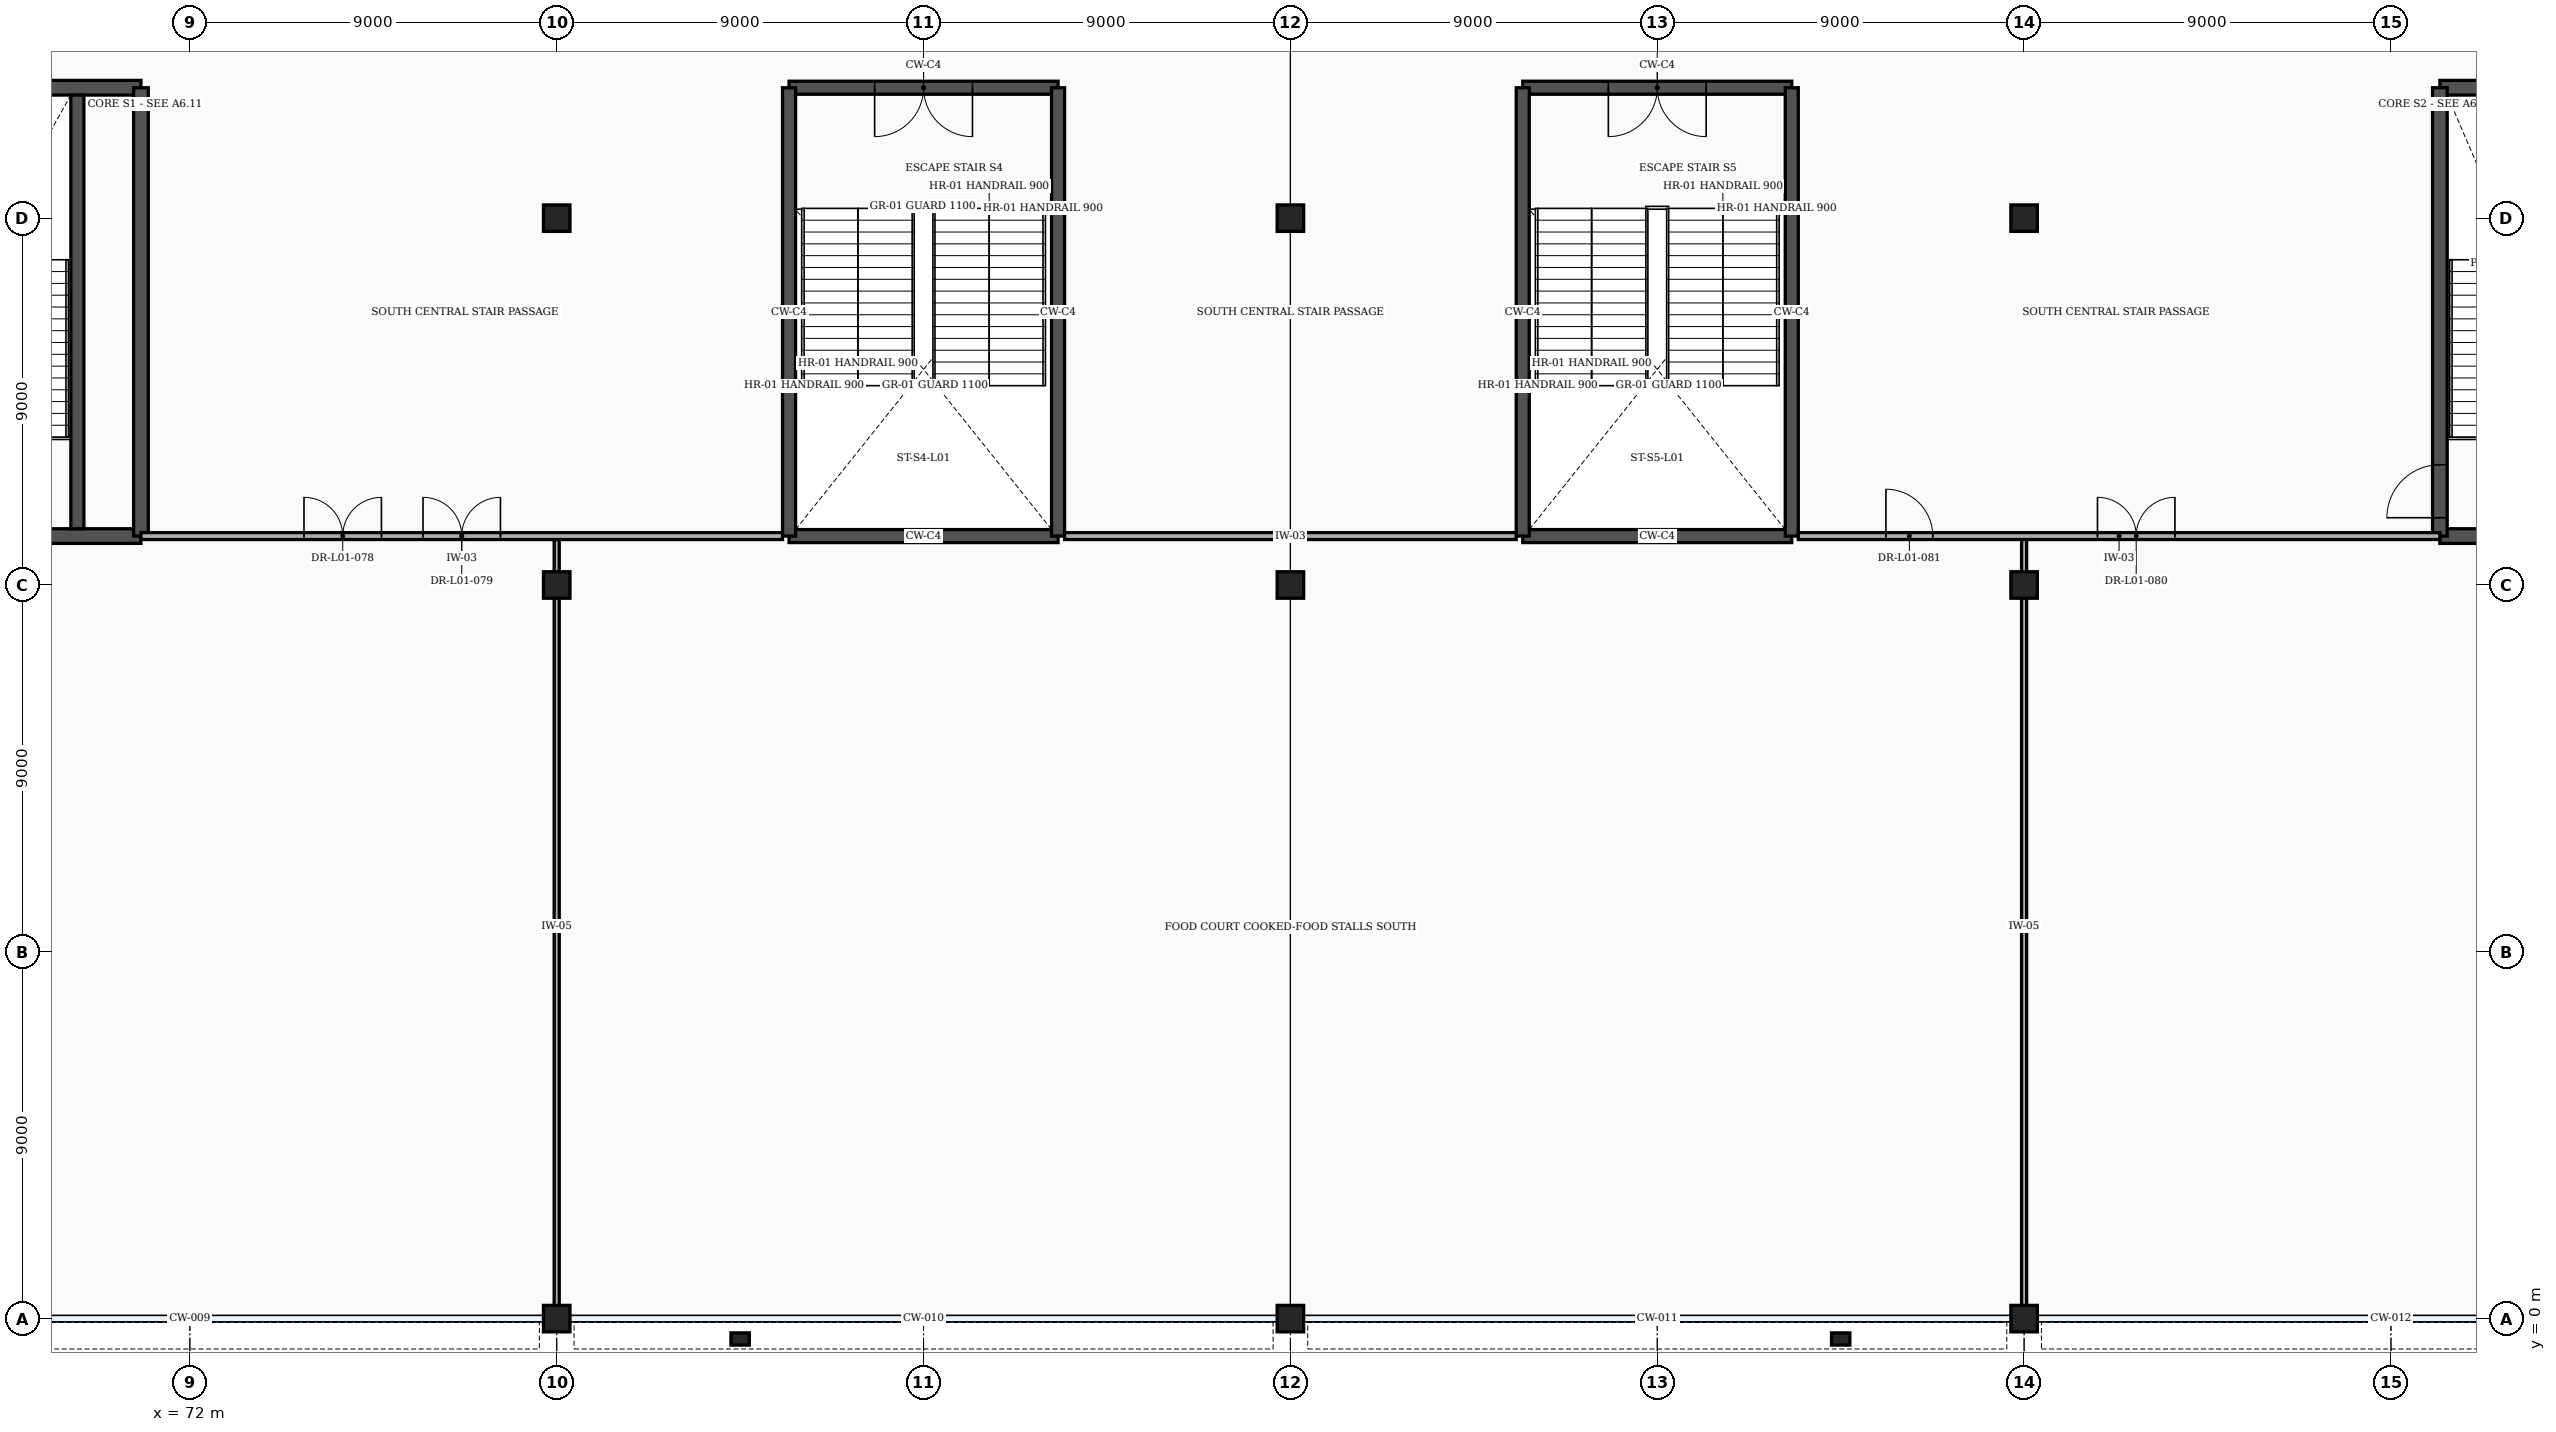
"""IFC4 building model, lengths in metres.
Left out: names, types, materials, properties, quantities, classifications, styles, units other than length and angle.
Written with IfcOpenShell. Run it as: python <this file> out.ifc"""

import sys

from ifc_helpers import new_model, si_unit, direction, frame, frame_2d, origin, origin_2d, place, context, subcontext, project, spatial, rectangle, extrude, element, fill, save


model = new_model("IFC4")
c1 = context("Model", 3, precision=1e-05, world=origin(), true_north=direction((0.0, 1.0)))
c2 = subcontext(c1, "Body", "Model", "MODEL_VIEW")
j1 = project(units=[si_unit("LENGTHUNIT", "METRE"), si_unit("PLANEANGLEUNIT", "RADIAN")], contexts=[c1])
p1 = place(None, origin())
s1 = spatial("IfcSite", under=j1, at=p1, CompositionType="ELEMENT")
p2 = place(p1, origin())
s2 = spatial("IfcBuilding", under=s1, at=p2, CompositionType="ELEMENT")
p3 = place(p2, frame((0.0, 0.0, 6.0)))
s3 = spatial("IfcBuildingStorey", under=s2, at=p3, CompositionType="ELEMENT", Elevation=6.0)
for number, where, z_axis, x_axis in (
    (1, (81.0, 0.0, 0.0), (0.0, 0.0, 1.0), (1.0, 0.0, 0.0)),
    (2, (81.0, 18.0, 0.0), (0.0, 0.0, 1.0), (1.0, 0.0, 0.0)),
    (3, (81.0, 27.0, 0.0), (0.0, 0.0, 1.0), (1.0, 0.0, 0.0)),
    (4, (99.0, 0.0, 0.0), (0.0, 0.0, 1.0), (1.0, 0.0, 0.0)),
    (5, (99.0, 18.0, 0.0), (0.0, 0.0, 1.0), (1.0, 0.0, 0.0)),
    (6, (99.0, 27.0, 0.0), (0.0, 0.0, 1.0), (1.0, 0.0, 0.0)),
    (7, (117.0, 0.0, 0.0), (0.0, 0.0, 1.0), (1.0, 0.0, 0.0)),
    (8, (117.0, 18.0, 0.0), (0.0, 0.0, 1.0), (1.0, 0.0, 0.0)),
    (9, (117.0, 27.0, 0.0), (0.0, 0.0, 1.0), (1.0, 0.0, 0.0)),
):
    element("IfcColumn", number, at=place(p3, frame(where, z_axis=z_axis, x_axis=x_axis)), inside=s3, PredefinedType="COLUMN", context=c2, shape_type="SweptSolid", body=[
        extrude(rectangle(XDim=0.65, YDim=0.65, at=origin_2d()), origin(), (0.0, 0.0, 1.0), 5.4),
    ])
for number, where, z_axis, x_axis in (
    (10, (85.5, -0.5, 0.0), (0.0, 0.0, 1.0), (1.0, 0.0, 0.0)),
    (11, (112.5, -0.5, 0.0), (0.0, 0.0, 1.0), (1.0, 0.0, 0.0)),
):
    element("IfcColumn", number, at=place(p3, frame(where, z_axis=z_axis, x_axis=x_axis)), inside=s3, PredefinedType="PILASTER", context=c2, shape_type="SweptSolid", body=[
        extrude(rectangle(XDim=0.45, YDim=0.3, at=origin_2d()), origin(), (0.0, 0.0, 1.0), 5.4),
    ])
for number, where, z_axis, x_axis in (
    (12, (64.2, 19.2, 0.0), (0.0, 0.0, 1.0), (1.0, 0.0, 0.0)),
    (13, (64.2, 30.2, 0.0), (0.0, 0.0, 1.0), (1.0, 0.0, 0.0)),
):
    element("IfcWall", number, at=place(p3, frame(where, z_axis=z_axis, x_axis=x_axis)), inside=s3, PredefinedType="SHEAR", context=c2, shape_type="SweptSolid", body=[
        extrude(rectangle(XDim=6.6, YDim=0.36, at=frame_2d((3.3, 0.0))), origin(), (0.0, 0.0, 1.0), 5.15),
    ])
p4 = place(p3, frame((70.8, 19.2, 0.0), z_axis=(0.0, 0.0, 1.0), x_axis=(0.0, 1.0, 0.0)))
e14 = element("IfcWall", 14, at=p4, inside=s3, PredefinedType="SHEAR", context=c2, shape_type="SweptSolid", body=[
    extrude(rectangle(XDim=11.0, YDim=0.36, at=frame_2d((5.5, 0.0))), origin(), (0.0, 0.0, 1.0), 5.15),
])
p5 = place(p3, frame((69.24, 19.38, 0.0), z_axis=(0.0, 0.0, 1.0), x_axis=(0.0, 1.0, 0.0)))
e15 = element("IfcWall", 15, at=p5, inside=s3, PredefinedType="SHEAR", context=c2, shape_type="SweptSolid", body=[
    extrude(rectangle(XDim=10.64, YDim=0.32, at=frame_2d((5.32, 0.0))), origin(), (0.0, 0.0, 1.0), 5.15),
])
p6 = place(p3, frame((127.2, 19.2, 0.0), z_axis=(0.0, 0.0, 1.0), x_axis=(1.0, 0.0, 0.0)))
e16 = element("IfcWall", 16, at=p6, inside=s3, PredefinedType="SHEAR", context=c2, shape_type="SweptSolid", body=[
    extrude(rectangle(XDim=6.6, YDim=0.36, at=frame_2d((3.3, 0.0))), origin(), (0.0, 0.0, 1.0), 5.15),
])
p7 = place(p3, frame((127.2, 30.2, 0.0), z_axis=(0.0, 0.0, 1.0), x_axis=(1.0, 0.0, 0.0)))
e17 = element("IfcWall", 17, at=p7, inside=s3, PredefinedType="SHEAR", context=c2, shape_type="SweptSolid", body=[
    extrude(rectangle(XDim=6.6, YDim=0.36, at=frame_2d((3.3, 0.0))), origin(), (0.0, 0.0, 1.0), 5.15),
])
p8 = place(p7, frame((4.45, 0.0, 0.0)))
e18 = element("IfcOpeningElement", 18, at=p8, cuts=e17, PredefinedType="OPENING", context=c2, shape_type="SweptSolid", body=[
    extrude(rectangle(XDim=1.6, YDim=2.3, at=frame_2d((0.8, 1.15))), frame((0.0, 0.192, 0.0), z_axis=(0.0, -1.0, 0.0), x_axis=(1.0, 0.0, 0.0)), (0.0, 0.0, 1.0), 0.384),
])
p9 = place(p3, frame((127.2, 19.2, 0.0), z_axis=(0.0, 0.0, 1.0), x_axis=(0.0, 1.0, 0.0)))
e19 = element("IfcWall", 19, at=p9, inside=s3, PredefinedType="SHEAR", context=c2, shape_type="SweptSolid", body=[
    extrude(rectangle(XDim=11.0, YDim=0.36, at=frame_2d((5.5, 0.0))), origin(), (0.0, 0.0, 1.0), 5.15),
])
p10 = place(p9, frame((0.45, 0.0, 0.0)))
e20 = element("IfcOpeningElement", 20, at=p10, cuts=e19, PredefinedType="OPENING", context=c2, shape_type="SweptSolid", body=[
    extrude(rectangle(XDim=1.3, YDim=2.2, at=frame_2d((0.65, 1.1))), frame((0.0, 0.192, 0.0), z_axis=(0.0, -1.0, 0.0), x_axis=(1.0, 0.0, 0.0)), (0.0, 0.0, 1.0), 0.384),
])
p11 = place(p3, frame((86.7, 19.2, 0.0), z_axis=(0.0, 0.0, 1.0), x_axis=(1.0, 0.0, 0.0)))
e21 = element("IfcWall", 21, at=p11, inside=s3, PredefinedType="SHEAR", context=c2, shape_type="SweptSolid", body=[
    extrude(rectangle(XDim=6.6, YDim=0.32, at=frame_2d((3.3, 0.0))), origin(), (0.0, 0.0, 1.0), 5.15),
])
p12 = place(p3, frame((86.7, 30.2, 0.0), z_axis=(0.0, 0.0, 1.0), x_axis=(1.0, 0.0, 0.0)))
e22 = element("IfcWall", 22, at=p12, inside=s3, PredefinedType="SHEAR", context=c2, shape_type="SweptSolid", body=[
    extrude(rectangle(XDim=6.6, YDim=0.32, at=frame_2d((3.3, 0.0))), origin(), (0.0, 0.0, 1.0), 5.15),
])
p13 = place(p12, frame((2.1, 0.0, 0.0)))
e23 = element("IfcOpeningElement", 23, at=p13, cuts=e22, PredefinedType="OPENING", context=c2, shape_type="SweptSolid", body=[
    extrude(rectangle(XDim=2.4, YDim=2.25, at=frame_2d((1.2, 1.125))), frame((0.0, 0.172, 0.0), z_axis=(0.0, -1.0, 0.0), x_axis=(1.0, 0.0, 0.0)), (0.0, 0.0, 1.0), 0.344),
])
for number, where, z_axis, x_axis in (
    (24, (86.7, 19.2, 0.0), (0.0, 0.0, 1.0), (0.0, 1.0, 0.0)),
    (25, (93.3, 19.2, 0.0), (0.0, 0.0, 1.0), (0.0, 1.0, 0.0)),
):
    element("IfcWall", number, at=place(p3, frame(where, z_axis=z_axis, x_axis=x_axis)), inside=s3, PredefinedType="SHEAR", context=c2, shape_type="SweptSolid", body=[
        extrude(rectangle(XDim=11.0, YDim=0.32, at=frame_2d((5.5, 0.0))), origin(), (0.0, 0.0, 1.0), 5.15),
    ])
p14 = place(p3, frame((104.7, 19.2, 0.0), z_axis=(0.0, 0.0, 1.0), x_axis=(1.0, 0.0, 0.0)))
e26 = element("IfcWall", 26, at=p14, inside=s3, PredefinedType="SHEAR", context=c2, shape_type="SweptSolid", body=[
    extrude(rectangle(XDim=6.6, YDim=0.32, at=frame_2d((3.3, 0.0))), origin(), (0.0, 0.0, 1.0), 5.15),
])
p15 = place(p3, frame((104.7, 30.2, 0.0), z_axis=(0.0, 0.0, 1.0), x_axis=(1.0, 0.0, 0.0)))
e27 = element("IfcWall", 27, at=p15, inside=s3, PredefinedType="SHEAR", context=c2, shape_type="SweptSolid", body=[
    extrude(rectangle(XDim=6.6, YDim=0.32, at=frame_2d((3.3, 0.0))), origin(), (0.0, 0.0, 1.0), 5.15),
])
p16 = place(p15, frame((2.1, 0.0, 0.0)))
e28 = element("IfcOpeningElement", 28, at=p16, cuts=e27, PredefinedType="OPENING", context=c2, shape_type="SweptSolid", body=[
    extrude(rectangle(XDim=2.4, YDim=2.25, at=frame_2d((1.2, 1.125))), frame((0.0, 0.172, 0.0), z_axis=(0.0, -1.0, 0.0), x_axis=(1.0, 0.0, 0.0)), (0.0, 0.0, 1.0), 0.344),
])
for number, where, z_axis, x_axis in (
    (29, (104.7, 19.2, 0.0), (0.0, 0.0, 1.0), (0.0, 1.0, 0.0)),
    (30, (111.3, 19.2, 0.0), (0.0, 0.0, 1.0), (0.0, 1.0, 0.0)),
):
    element("IfcWall", number, at=place(p3, frame(where, z_axis=z_axis, x_axis=x_axis)), inside=s3, PredefinedType="SHEAR", context=c2, shape_type="SweptSolid", body=[
        extrude(rectangle(XDim=11.0, YDim=0.32, at=frame_2d((5.5, 0.0))), origin(), (0.0, 0.0, 1.0), 5.15),
    ])
for number, where, z_axis, x_axis in (
    (31, (81.0, 0.157, 0.0), (0.0, 0.0, 1.0), (0.0, 1.0, 0.0)),
    (32, (117.0, 0.157, 0.0), (0.0, 0.0, 1.0), (0.0, 1.0, 0.0)),
):
    element("IfcWall", number, at=place(p3, frame(where, z_axis=z_axis, x_axis=x_axis)), inside=s3, PredefinedType="PARTITIONING", context=c2, shape_type="SweptSolid", body=[
        extrude(rectangle(XDim=18.958, YDim=0.125, at=frame_2d((9.479, 0.0))), origin(), (0.0, 0.0, 1.0), 4.538),
    ])
p17 = place(p3, frame((70.8, 19.2, 0.0), z_axis=(0.0, 0.0, 1.0), x_axis=(1.0, 0.0, 0.0)))
e33 = element("IfcWall", 33, at=p17, inside=s3, PredefinedType="PARTITIONING", context=c2, shape_type="SweptSolid", body=[
    extrude(rectangle(XDim=15.74, YDim=0.17, at=frame_2d((7.87, 0.0))), origin(), (0.0, 0.0, 1.0), 5.15),
])
p18 = place(p17, frame((4.0, 0.0, 0.0)))
e34 = element("IfcOpeningElement", 34, at=p18, cuts=e33, PredefinedType="OPENING", context=c2, shape_type="SweptSolid", body=[
    extrude(rectangle(XDim=1.9, YDim=2.35, at=frame_2d((0.95, 1.175))), frame((0.0, 0.097, 0.0), z_axis=(0.0, -1.0, 0.0), x_axis=(1.0, 0.0, 0.0)), (0.0, 0.0, 1.0), 0.194),
])
p19 = place(p17, frame((6.92, 0.0, 0.0)))
e35 = element("IfcOpeningElement", 35, at=p19, cuts=e33, PredefinedType="OPENING", context=c2, shape_type="SweptSolid", body=[
    extrude(rectangle(XDim=1.9, YDim=2.35, at=frame_2d((0.95, 1.175))), frame((0.0, 0.097, 0.0), z_axis=(0.0, -1.0, 0.0), x_axis=(1.0, 0.0, 0.0)), (0.0, 0.0, 1.0), 0.194),
])
p20 = place(p3, frame((93.46, 19.2, 0.0), z_axis=(0.0, 0.0, 1.0), x_axis=(1.0, 0.0, 0.0)))
e36 = element("IfcWall", 36, at=p20, inside=s3, PredefinedType="PARTITIONING", context=c2, shape_type="SweptSolid", body=[
    extrude(rectangle(XDim=11.08, YDim=0.17, at=frame_2d((5.54, 0.0))), origin(), (0.0, 0.0, 1.0), 5.15),
])
p21 = place(p3, frame((111.46, 19.2, 0.0), z_axis=(0.0, 0.0, 1.0), x_axis=(1.0, 0.0, 0.0)))
e37 = element("IfcWall", 37, at=p21, inside=s3, PredefinedType="PARTITIONING", context=c2, shape_type="SweptSolid", body=[
    extrude(rectangle(XDim=15.74, YDim=0.17, at=frame_2d((7.87, 0.0))), origin(), (0.0, 0.0, 1.0), 5.15),
])
p22 = place(p21, frame((7.34, 0.0, 0.0)))
e38 = element("IfcOpeningElement", 38, at=p22, cuts=e37, PredefinedType="OPENING", context=c2, shape_type="SweptSolid", body=[
    extrude(rectangle(XDim=1.9, YDim=2.35, at=frame_2d((0.95, 1.175))), frame((0.0, 0.097, 0.0), z_axis=(0.0, -1.0, 0.0), x_axis=(1.0, 0.0, 0.0)), (0.0, 0.0, 1.0), 0.194),
])
p23 = place(p21, frame((2.15, 0.0, 0.0)))
e39 = element("IfcOpeningElement", 39, at=p23, cuts=e37, PredefinedType="OPENING", context=c2, shape_type="SweptSolid", body=[
    extrude(rectangle(XDim=1.15, YDim=2.15, at=frame_2d((0.575, 1.075))), frame((0.0, 0.097, 0.0), z_axis=(0.0, -1.0, 0.0), x_axis=(1.0, 0.0, 0.0)), (0.0, 0.0, 1.0), 0.194),
])
p24 = place(p10, origin())
e40 = element("IfcDoor", 40, at=p24, inside=s3, OperationType="SINGLE_SWING_LEFT", PredefinedType="DOOR", context=c2, shape_type="SweptSolid", body=[
    extrude(rectangle(XDim=1.3, YDim=2.2, at=frame_2d((0.65, 1.1))), frame((0.0, 0.025, 0.0), z_axis=(0.0, -1.0, 0.0), x_axis=(1.0, 0.0, 0.0)), (0.0, 0.0, 1.0), 0.05),
])
fill(e20, e40)
p25 = place(p13, frame((2.4, 0.0, 0.0), z_axis=(0.0, 0.0, 1.0), x_axis=(-1.0, 0.0, 0.0)))
e41 = element("IfcDoor", 41, at=p25, inside=s3, OperationType="DOUBLE_DOOR_SINGLE_SWING", PredefinedType="DOOR", context=c2, shape_type="SweptSolid", body=[
    extrude(rectangle(XDim=2.4, YDim=2.25, at=frame_2d((1.2, 1.125))), frame((0.0, 0.025, 0.0), z_axis=(0.0, -1.0, 0.0), x_axis=(1.0, 0.0, 0.0)), (0.0, 0.0, 1.0), 0.05),
])
fill(e23, e41)
p26 = place(p16, frame((2.4, 0.0, 0.0), z_axis=(0.0, 0.0, 1.0), x_axis=(-1.0, 0.0, 0.0)))
e42 = element("IfcDoor", 42, at=p26, inside=s3, OperationType="DOUBLE_DOOR_SINGLE_SWING", PredefinedType="DOOR", context=c2, shape_type="SweptSolid", body=[
    extrude(rectangle(XDim=2.4, YDim=2.25, at=frame_2d((1.2, 1.125))), frame((0.0, 0.025, 0.0), z_axis=(0.0, -1.0, 0.0), x_axis=(1.0, 0.0, 0.0)), (0.0, 0.0, 1.0), 0.05),
])
fill(e28, e42)
p27 = place(p18, origin())
e43 = element("IfcDoor", 43, at=p27, inside=s3, OperationType="DOUBLE_DOOR_SINGLE_SWING", PredefinedType="DOOR", context=c2, shape_type="SweptSolid", body=[
    extrude(rectangle(XDim=1.9, YDim=2.35, at=frame_2d((0.95, 1.175))), frame((0.0, 0.025, 0.0), z_axis=(0.0, -1.0, 0.0), x_axis=(1.0, 0.0, 0.0)), (0.0, 0.0, 1.0), 0.05),
])
fill(e34, e43)
p28 = place(p19, origin())
e44 = element("IfcDoor", 44, at=p28, inside=s3, OperationType="DOUBLE_DOOR_SINGLE_SWING", PredefinedType="DOOR", context=c2, shape_type="SweptSolid", body=[
    extrude(rectangle(XDim=1.9, YDim=2.35, at=frame_2d((0.95, 1.175))), frame((0.0, 0.025, 0.0), z_axis=(0.0, -1.0, 0.0), x_axis=(1.0, 0.0, 0.0)), (0.0, 0.0, 1.0), 0.05),
])
fill(e35, e44)
p29 = place(p22, origin())
e45 = element("IfcDoor", 45, at=p29, inside=s3, OperationType="DOUBLE_DOOR_SINGLE_SWING", PredefinedType="DOOR", context=c2, shape_type="SweptSolid", body=[
    extrude(rectangle(XDim=1.9, YDim=2.35, at=frame_2d((0.95, 1.175))), frame((0.0, 0.025, 0.0), z_axis=(0.0, -1.0, 0.0), x_axis=(1.0, 0.0, 0.0)), (0.0, 0.0, 1.0), 0.05),
])
fill(e38, e45)
p30 = place(p23, origin())
e46 = element("IfcDoor", 46, at=p30, inside=s3, OperationType="SINGLE_SWING_LEFT", PredefinedType="DOOR", context=c2, shape_type="SweptSolid", body=[
    extrude(rectangle(XDim=1.15, YDim=2.15, at=frame_2d((0.575, 1.075))), frame((0.0, 0.025, 0.0), z_axis=(0.0, -1.0, 0.0), x_axis=(1.0, 0.0, 0.0)), (0.0, 0.0, 1.0), 0.05),
])
fill(e39, e46)
save(model, sys.argv[1])
